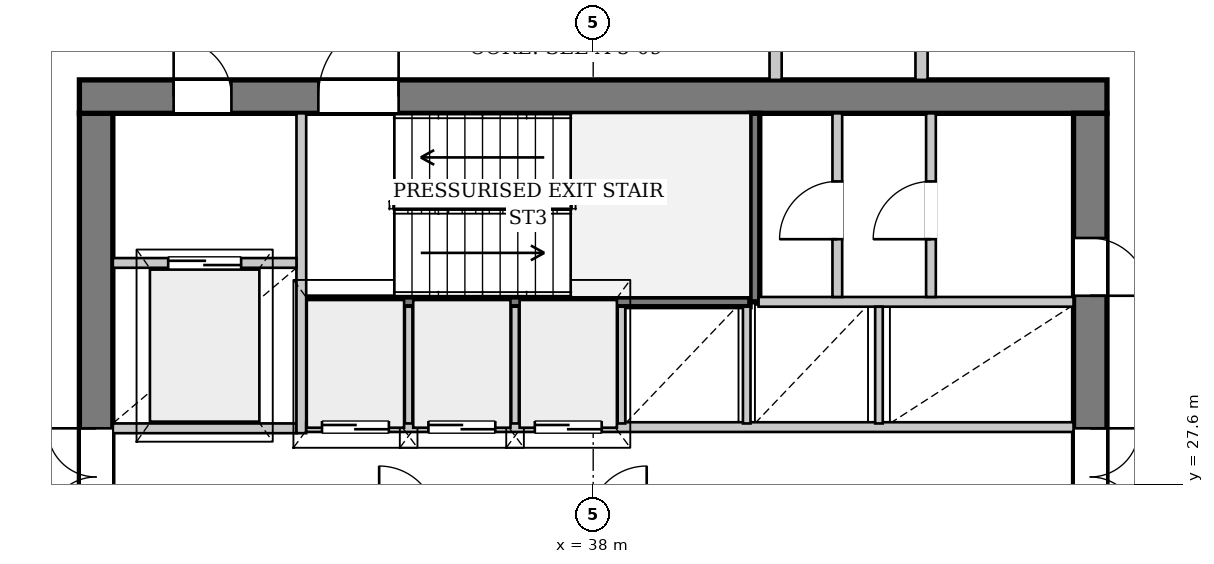
"""IFC4 building model, lengths in metres.
Left out: names, types, materials, properties, quantities, classifications, styles, units other than length and angle.
Written with IfcOpenShell. Run it as: python <this file> out.ifc"""

import sys

from ifc_helpers import new_model, si_unit, direction, frame, frame_2d, origin, place, context, subcontext, project, spatial, rectangle, extrude, source, transform, mapped, element, fill, save


model = new_model("IFC4")
c1 = context("Model", 3, precision=1e-05, world=origin(), true_north=direction((0.0, 1.0)))
c2 = subcontext(c1, "Body", "Model", "MODEL_VIEW")
j1 = project(units=[si_unit("LENGTHUNIT", "METRE"), si_unit("PLANEANGLEUNIT", "RADIAN")], contexts=[c1])
p1 = place(None, origin())
s1 = spatial("IfcSite", under=j1, at=p1, CompositionType="ELEMENT")
p2 = place(p1, origin())
s2 = spatial("IfcBuilding", under=s1, at=p2, CompositionType="ELEMENT")
p3 = place(p2, frame((0.0, 0.0, 192.75)))
s3 = spatial("IfcBuildingStorey", under=s2, at=p3, CompositionType="ELEMENT", Elevation=192.75)
p4 = place(p3, frame((16.146, 34.177, 0.0), z_axis=(0.0, 0.0, 1.0), x_axis=(0.928328726299, 0.371760374339, 0.0)))
e1 = element("IfcWall", 1, at=p4, inside=s3, PredefinedType="SOLIDWALL", context=c2, shape_type="SweptSolid", body=[
    extrude(rectangle(XDim=22.656, YDim=0.38, at=frame_2d((11.328, 0.0))), origin(), (0.0, 0.0, 1.0), 2.722),
])
p5 = place(p4, frame((5.244, 0.0, 0.352)))
e2 = element("IfcOpeningElement", 2, at=p5, cuts=e1, PredefinedType="OPENING", context=c2, shape_type="SweptSolid", body=[
    extrude(rectangle(XDim=2.2, YDim=2.25, at=frame_2d((1.1, 1.125))), frame((0.0, 0.2, 0.0), z_axis=(0.0, -1.0, 0.0), x_axis=(1.0, 0.0, 0.0)), (0.0, 0.0, 1.0), 0.4),
])
p6 = place(p4, frame((15.212, 0.0, 0.352)))
e3 = element("IfcOpeningElement", 3, at=p6, cuts=e1, PredefinedType="OPENING", context=c2, shape_type="SweptSolid", body=[
    extrude(rectangle(XDim=2.2, YDim=2.25, at=frame_2d((1.1, 1.125))), frame((0.0, 0.2, 0.0), z_axis=(0.0, -1.0, 0.0), x_axis=(1.0, 0.0, 0.0)), (0.0, 0.0, 1.0), 0.4),
])
p7 = place(p3, frame((29.825, 19.5, 0.0), z_axis=(0.0, 0.0, 1.0), x_axis=(0.0, 1.0, 0.0)))
e4 = element("IfcWall", 4, at=p7, inside=s3, PredefinedType="SHEAR", context=c2, shape_type="SweptSolid", body=[
    extrude(rectangle(XDim=14.2, YDim=0.55, at=frame_2d((7.1, 0.0))), origin(), (0.0, 0.0, 1.0), 3.33),
])
p8 = place(p7, frame((7.42, 0.0, 0.0)))
e5 = element("IfcOpeningElement", 5, at=p8, cuts=e4, PredefinedType="OPENING", context=c2, shape_type="SweptSolid", body=[
    extrude(rectangle(XDim=1.6, YDim=2.2, at=frame_2d((0.8, 1.1))), frame((0.0, 0.285, 0.0), z_axis=(0.0, -1.0, 0.0), x_axis=(1.0, 0.0, 0.0)), (0.0, 0.0, 1.0), 0.57),
])
p9 = place(p3, frame((29.55, 33.975, 0.0), z_axis=(0.0, 0.0, 1.0), x_axis=(1.0, 0.0, 0.0)))
e6 = element("IfcWall", 6, at=p9, inside=s3, PredefinedType="SHEAR", context=c2, shape_type="SweptSolid", body=[
    extrude(rectangle(XDim=16.9, YDim=0.55, at=frame_2d((8.45, 0.0))), origin(), (0.0, 0.0, 1.0), 3.33),
])
p10 = place(p9, frame((1.55, 0.0, 0.0)))
e7 = element("IfcOpeningElement", 7, at=p10, cuts=e6, PredefinedType="OPENING", context=c2, shape_type="SweptSolid", body=[
    extrude(rectangle(XDim=0.95, YDim=2.1, at=frame_2d((0.475, 1.05))), frame((0.0, 0.285, 0.0), z_axis=(0.0, -1.0, 0.0), x_axis=(1.0, 0.0, 0.0)), (0.0, 0.0, 1.0), 0.57),
])
p11 = place(p9, frame((3.93, 0.0, 0.0)))
e8 = element("IfcOpeningElement", 8, at=p11, cuts=e6, PredefinedType="OPENING", context=c2, shape_type="SweptSolid", body=[
    extrude(rectangle(XDim=1.32, YDim=2.2, at=frame_2d((0.66, 1.1))), frame((0.0, 0.285, 0.0), z_axis=(0.0, -1.0, 0.0), x_axis=(1.0, 0.0, 0.0)), (0.0, 0.0, 1.0), 0.57),
])
p12 = place(p3, frame((46.175, 33.7, 0.0), z_axis=(0.0, 0.0, 1.0), x_axis=(0.0, -1.0, 0.0)))
e9 = element("IfcWall", 9, at=p12, inside=s3, PredefinedType="SHEAR", context=c2, shape_type="SweptSolid", body=[
    extrude(rectangle(XDim=14.2, YDim=0.55, at=frame_2d((7.1, 0.0))), origin(), (0.0, 0.0, 1.0), 3.33),
])
p13 = place(p12, frame((5.18, 0.0, 0.0)))
e10 = element("IfcOpeningElement", 10, at=p13, cuts=e9, PredefinedType="OPENING", context=c2, shape_type="SweptSolid", body=[
    extrude(rectangle(XDim=1.6, YDim=2.2, at=frame_2d((0.8, 1.1))), frame((0.0, 0.285, 0.0), z_axis=(0.0, -1.0, 0.0), x_axis=(1.0, 0.0, 0.0)), (0.0, 0.0, 1.0), 0.57),
])
p14 = place(p12, frame((2.05, 0.0, 0.0)))
e11 = element("IfcOpeningElement", 11, at=p14, cuts=e9, PredefinedType="OPENING", context=c2, shape_type="SweptSolid", body=[
    extrude(rectangle(XDim=0.95, YDim=2.1, at=frame_2d((0.475, 1.05))), frame((0.0, 0.285, 0.0), z_axis=(0.0, -1.0, 0.0), x_axis=(1.0, 0.0, 0.0)), (0.0, 0.0, 1.0), 0.57),
])
p15 = place(p3, frame((33.28, 30.6, 0.0), z_axis=(0.0, 0.0, 1.0), x_axis=(1.0, 0.0, 0.0)))
e12 = element("IfcWall", 12, at=p15, inside=s3, PredefinedType="PARTITIONING", context=c2, shape_type="SweptSolid", body=[
    extrude(rectangle(XDim=7.3, YDim=0.16, at=frame_2d((3.65, 0.0))), origin(), (0.0, 0.0, 1.0), 3.33),
])
p16 = place(p3, frame((40.66, 30.6, 0.0), z_axis=(0.0, 0.0, 1.0), x_axis=(0.0, 1.0, 0.0)))
e13 = element("IfcWall", 13, at=p16, inside=s3, PredefinedType="PARTITIONING", context=c2, shape_type="SweptSolid", body=[
    extrude(rectangle(XDim=3.1, YDim=0.16, at=frame_2d((1.55, 0.0))), origin(), (0.0, 0.0, 1.0), 3.33),
])
p17 = place(p3, frame((30.1, 28.52, 0.0), z_axis=(0.0, 0.0, 1.0), x_axis=(1.0, 0.0, 0.0)))
e14 = element("IfcWall", 14, at=p17, inside=s3, PredefinedType="PARTITIONING", context=c2, shape_type="SweptSolid", body=[
    extrude(rectangle(XDim=3.02, YDim=0.16, at=frame_2d((1.51, 0.0))), origin(), (0.0, 0.0, 1.0), 3.33),
])
p18 = place(p3, frame((33.2, 28.44, 0.0), z_axis=(0.0, 0.0, 1.0), x_axis=(0.0, 1.0, 0.0)))
e15 = element("IfcWall", 15, at=p18, inside=s3, PredefinedType="PARTITIONING", context=c2, shape_type="SweptSolid", body=[
    extrude(rectangle(XDim=5.26, YDim=0.16, at=frame_2d((2.63, 0.0))), origin(), (0.0, 0.0, 1.0), 3.33),
])
p19 = place(p3, frame((30.1, 31.24, 0.0), z_axis=(0.0, 0.0, 1.0), x_axis=(1.0, 0.0, 0.0)))
e16 = element("IfcWall", 16, at=p19, inside=s3, PredefinedType="PARTITIONING", context=c2, shape_type="SweptSolid", body=[
    extrude(rectangle(XDim=3.02, YDim=0.16, at=frame_2d((1.51, 0.0))), origin(), (0.0, 0.0, 1.0), 3.33),
])
p20 = place(p19, frame((0.91, 0.0, 0.0)))
e17 = element("IfcOpeningElement", 17, at=p20, cuts=e16, PredefinedType="OPENING", context=c2, shape_type="SweptSolid", body=[
    extrude(rectangle(XDim=1.2, YDim=2.2, at=frame_2d((0.6, 1.1))), frame((0.0, 0.09, 0.0), z_axis=(0.0, -1.0, 0.0), x_axis=(1.0, 0.0, 0.0)), (0.0, 0.0, 1.0), 0.18),
])
p21 = place(p3, frame((33.28, 28.54, 0.0), z_axis=(0.0, 0.0, 1.0), x_axis=(1.0, 0.0, 0.0)))
e18 = element("IfcWall", 18, at=p21, inside=s3, PredefinedType="PARTITIONING", context=c2, shape_type="SweptSolid", body=[
    extrude(rectangle(XDim=12.62, YDim=0.16, at=frame_2d((6.31, 0.0))), origin(), (0.0, 0.0, 1.0), 3.33),
])
p22 = place(p21, frame((0.26, 0.0, 0.0)))
e19 = element("IfcOpeningElement", 19, at=p22, cuts=e18, PredefinedType="OPENING", context=c2, shape_type="SweptSolid", body=[
    extrude(rectangle(XDim=1.1, YDim=2.2, at=frame_2d((0.55, 1.1))), frame((0.0, 0.09, 0.0), z_axis=(0.0, -1.0, 0.0), x_axis=(1.0, 0.0, 0.0)), (0.0, 0.0, 1.0), 0.18),
])
p23 = place(p21, frame((2.01, 0.0, 0.0)))
e20 = element("IfcOpeningElement", 20, at=p23, cuts=e18, PredefinedType="OPENING", context=c2, shape_type="SweptSolid", body=[
    extrude(rectangle(XDim=1.1, YDim=2.2, at=frame_2d((0.55, 1.1))), frame((0.0, 0.09, 0.0), z_axis=(0.0, -1.0, 0.0), x_axis=(1.0, 0.0, 0.0)), (0.0, 0.0, 1.0), 0.18),
])
p24 = place(p21, frame((3.76, 0.0, 0.0)))
e21 = element("IfcOpeningElement", 21, at=p24, cuts=e18, PredefinedType="OPENING", context=c2, shape_type="SweptSolid", body=[
    extrude(rectangle(XDim=1.1, YDim=2.2, at=frame_2d((0.55, 1.1))), frame((0.0, 0.09, 0.0), z_axis=(0.0, -1.0, 0.0), x_axis=(1.0, 0.0, 0.0)), (0.0, 0.0, 1.0), 0.18),
])
p25 = place(p3, frame((40.72, 30.6, 0.0), z_axis=(0.0, 0.0, 1.0), x_axis=(1.0, 0.0, 0.0)))
e22 = element("IfcWall", 22, at=p25, inside=s3, PredefinedType="PARTITIONING", context=c2, shape_type="SweptSolid", body=[
    extrude(rectangle(XDim=5.18, YDim=0.16, at=frame_2d((2.59, 0.0))), origin(), (0.0, 0.0, 1.0), 3.33),
])
for number, where, z_axis, x_axis in (
    (23, (34.965, 28.6, 0.0), (0.0, 0.0, 1.0), (0.0, 1.0, 0.0)),
    (24, (36.715, 28.6, 0.0), (0.0, 0.0, 1.0), (0.0, 1.0, 0.0)),
    (25, (38.465, 28.6, 0.0), (0.0, 0.0, 1.0), (0.0, 1.0, 0.0)),
    (26, (40.525, 28.6, 0.0), (0.0, 0.0, 1.0), (0.0, 1.0, 0.0)),
    (27, (42.7, 28.6, 0.0), (0.0, 0.0, 1.0), (0.0, 1.0, 0.0)),
):
    element("IfcWall", number, at=place(p3, frame(where, z_axis=z_axis, x_axis=x_axis)), inside=s3, PredefinedType="PARTITIONING", context=c2, shape_type="SweptSolid", body=[
        extrude(rectangle(XDim=1.92, YDim=0.125, at=frame_2d((0.96, 0.0))), origin(), (0.0, 0.0, 1.0), 3.33),
    ])
p26 = place(p3, frame((42.015, 30.68, 0.0), z_axis=(0.0, 0.0, 1.0), x_axis=(0.0, 1.0, 0.0)))
e28 = element("IfcWall", 28, at=p26, inside=s3, PredefinedType="PARTITIONING", context=c2, shape_type="SweptSolid", body=[
    extrude(rectangle(XDim=3.02, YDim=0.16, at=frame_2d((1.51, 0.0))), origin(), (0.0, 0.0, 1.0), 3.33),
])
p27 = place(p26, frame((0.95, 0.0, 0.0)))
e29 = element("IfcOpeningElement", 29, at=p27, cuts=e28, PredefinedType="OPENING", context=c2, shape_type="SweptSolid", body=[
    extrude(rectangle(XDim=0.95, YDim=2.1, at=frame_2d((0.475, 1.05))), frame((0.0, 0.09, 0.0), z_axis=(0.0, -1.0, 0.0), x_axis=(1.0, 0.0, 0.0)), (0.0, 0.0, 1.0), 0.18),
])
p28 = place(p3, frame((43.555, 30.68, 0.0), z_axis=(0.0, 0.0, 1.0), x_axis=(0.0, 1.0, 0.0)))
e30 = element("IfcWall", 30, at=p28, inside=s3, PredefinedType="PARTITIONING", context=c2, shape_type="SweptSolid", body=[
    extrude(rectangle(XDim=3.02, YDim=0.16, at=frame_2d((1.51, 0.0))), origin(), (0.0, 0.0, 1.0), 3.33),
])
p29 = place(p28, frame((0.95, 0.0, 0.0)))
e31 = element("IfcOpeningElement", 31, at=p29, cuts=e30, PredefinedType="OPENING", context=c2, shape_type="SweptSolid", body=[
    extrude(rectangle(XDim=0.95, YDim=2.1, at=frame_2d((0.475, 1.05))), frame((0.0, 0.09, 0.0), z_axis=(0.0, -1.0, 0.0), x_axis=(1.0, 0.0, 0.0)), (0.0, 0.0, 1.0), 0.18),
])
for number, where, z_axis, x_axis in (
    (32, (41.0, 34.25, 0.0), (0.0, 0.0, 1.0), (0.0, 1.0, 0.0)),
    (33, (43.4, 34.25, 0.0), (0.0, 0.0, 1.0), (0.0, 1.0, 0.0)),
):
    element("IfcWall", number, at=place(p3, frame(where, z_axis=z_axis, x_axis=x_axis)), inside=s3, PredefinedType="PARTITIONING", context=c2, shape_type="SweptSolid", body=[
        extrude(rectangle(XDim=1.95, YDim=0.2, at=frame_2d((0.975, 0.0))), origin(), (0.0, 0.0, 1.0), 3.33),
    ])
m1 = source(origin(), c2, "Body", "SweptSolid", [
    extrude(rectangle(XDim=1.6, YDim=2.2, at=frame_2d((0.8, 1.1))), frame((0.0, 0.025, 0.0), z_axis=(0.0, -1.0, 0.0), x_axis=(1.0, 0.0, 0.0)), (0.0, 0.0, 1.0), 0.05),
])
p30 = place(p8, origin())
e34 = element("IfcDoor", 34, at=p30, inside=s3, OperationType="DOUBLE_DOOR_SINGLE_SWING", PredefinedType="DOOR", context=c2, shape_type="MappedRepresentation", body=[
    mapped(m1, transform((0.0, 0.0, 0.0), x_axis=(1.0, 0.0, 0.0), y_axis=(0.0, 1.0, 0.0), z_axis=(0.0, 0.0, 1.0), scale=1.0)),
])
fill(e5, e34)
m2 = source(origin(), c2, "Body", "SweptSolid", [
    extrude(rectangle(XDim=0.95, YDim=2.1, at=frame_2d((0.475, 1.05))), frame((0.0, 0.025, 0.0), z_axis=(0.0, -1.0, 0.0), x_axis=(1.0, 0.0, 0.0)), (0.0, 0.0, 1.0), 0.05),
])
p31 = place(p10, origin())
e35 = element("IfcDoor", 35, at=p31, inside=s3, OperationType="SINGLE_SWING_LEFT", PredefinedType="DOOR", context=c2, shape_type="MappedRepresentation", body=[
    mapped(m2, transform((0.0, 0.0, 0.0), x_axis=(1.0, 0.0, 0.0), y_axis=(0.0, 1.0, 0.0), z_axis=(0.0, 0.0, 1.0), scale=1.0)),
])
fill(e7, e35)
m3 = source(origin(), c2, "Body", "SweptSolid", [
    extrude(rectangle(XDim=1.32, YDim=2.2, at=frame_2d((0.66, 1.1))), frame((0.0, 0.025, 0.0), z_axis=(0.0, -1.0, 0.0), x_axis=(1.0, 0.0, 0.0)), (0.0, 0.0, 1.0), 0.05),
])
p32 = place(p11, origin())
e36 = element("IfcDoor", 36, at=p32, inside=s3, OperationType="SINGLE_SWING_RIGHT", PredefinedType="DOOR", context=c2, shape_type="MappedRepresentation", body=[
    mapped(m3, transform((0.0, 0.0, 0.0), x_axis=(1.0, 0.0, 0.0), y_axis=(0.0, 1.0, 0.0), z_axis=(0.0, 0.0, 1.0), scale=1.0)),
])
fill(e8, e36)
p33 = place(p13, origin())
e37 = element("IfcDoor", 37, at=p33, inside=s3, OperationType="DOUBLE_DOOR_SINGLE_SWING", PredefinedType="DOOR", context=c2, shape_type="MappedRepresentation", body=[
    mapped(m1, transform((0.0, 0.0, 0.0), x_axis=(1.0, 0.0, 0.0), y_axis=(0.0, 1.0, 0.0), z_axis=(0.0, 0.0, 1.0), scale=1.0)),
])
fill(e10, e37)
m4 = source(origin(), c2, "Body", "SweptSolid", [
    extrude(rectangle(XDim=1.2, YDim=2.2, at=frame_2d((0.6, 1.1))), frame((0.0, 0.025, 0.0), z_axis=(0.0, -1.0, 0.0), x_axis=(1.0, 0.0, 0.0)), (0.0, 0.0, 1.0), 0.05),
])
p34 = place(p20, origin())
e38 = element("IfcDoor", 38, at=p34, inside=s3, OperationType="DOUBLE_DOOR_SLIDING", PredefinedType="DOOR", context=c2, shape_type="MappedRepresentation", body=[
    mapped(m4, transform((0.0, 0.0, 0.0), x_axis=(1.0, 0.0, 0.0), y_axis=(0.0, 1.0, 0.0), z_axis=(0.0, 0.0, 1.0), scale=1.0)),
])
fill(e17, e38)
m5 = source(origin(), c2, "Body", "SweptSolid", [
    extrude(rectangle(XDim=1.1, YDim=2.2, at=frame_2d((0.55, 1.1))), frame((0.0, 0.025, 0.0), z_axis=(0.0, -1.0, 0.0), x_axis=(1.0, 0.0, 0.0)), (0.0, 0.0, 1.0), 0.05),
])
p35 = place(p22, origin())
e39 = element("IfcDoor", 39, at=p35, inside=s3, OperationType="DOUBLE_DOOR_SLIDING", PredefinedType="DOOR", context=c2, shape_type="MappedRepresentation", body=[
    mapped(m5, transform((0.0, 0.0, 0.0), x_axis=(1.0, 0.0, 0.0), y_axis=(0.0, 1.0, 0.0), z_axis=(0.0, 0.0, 1.0), scale=1.0)),
])
fill(e19, e39)
p36 = place(p23, origin())
e40 = element("IfcDoor", 40, at=p36, inside=s3, OperationType="DOUBLE_DOOR_SLIDING", PredefinedType="DOOR", context=c2, shape_type="MappedRepresentation", body=[
    mapped(m5, transform((0.0, 0.0, 0.0), x_axis=(1.0, 0.0, 0.0), y_axis=(0.0, 1.0, 0.0), z_axis=(0.0, 0.0, 1.0), scale=1.0)),
])
fill(e20, e40)
p37 = place(p24, origin())
e41 = element("IfcDoor", 41, at=p37, inside=s3, OperationType="DOUBLE_DOOR_SLIDING", PredefinedType="DOOR", context=c2, shape_type="MappedRepresentation", body=[
    mapped(m5, transform((0.0, 0.0, 0.0), x_axis=(1.0, 0.0, 0.0), y_axis=(0.0, 1.0, 0.0), z_axis=(0.0, 0.0, 1.0), scale=1.0)),
])
fill(e21, e41)
p38 = place(p27, origin())
e42 = element("IfcDoor", 42, at=p38, inside=s3, OperationType="SINGLE_SWING_LEFT", PredefinedType="DOOR", context=c2, shape_type="MappedRepresentation", body=[
    mapped(m2, transform((0.0, 0.0, 0.0), x_axis=(1.0, 0.0, 0.0), y_axis=(0.0, 1.0, 0.0), z_axis=(0.0, 0.0, 1.0), scale=1.0)),
])
fill(e29, e42)
p39 = place(p29, origin())
e43 = element("IfcDoor", 43, at=p39, inside=s3, OperationType="SINGLE_SWING_LEFT", PredefinedType="DOOR", context=c2, shape_type="MappedRepresentation", body=[
    mapped(m2, transform((0.0, 0.0, 0.0), x_axis=(1.0, 0.0, 0.0), y_axis=(0.0, 1.0, 0.0), z_axis=(0.0, 0.0, 1.0), scale=1.0)),
])
fill(e31, e43)
p40 = place(p14, origin())
e44 = element("IfcDoor", 44, at=p40, inside=s3, OperationType="SINGLE_SWING_RIGHT", PredefinedType="DOOR", context=c2, shape_type="MappedRepresentation", body=[
    mapped(m2, transform((0.0, 0.0, 0.0), x_axis=(1.0, 0.0, 0.0), y_axis=(0.0, 1.0, 0.0), z_axis=(0.0, 0.0, 1.0), scale=1.0)),
])
fill(e11, e44)
save(model, sys.argv[1])
